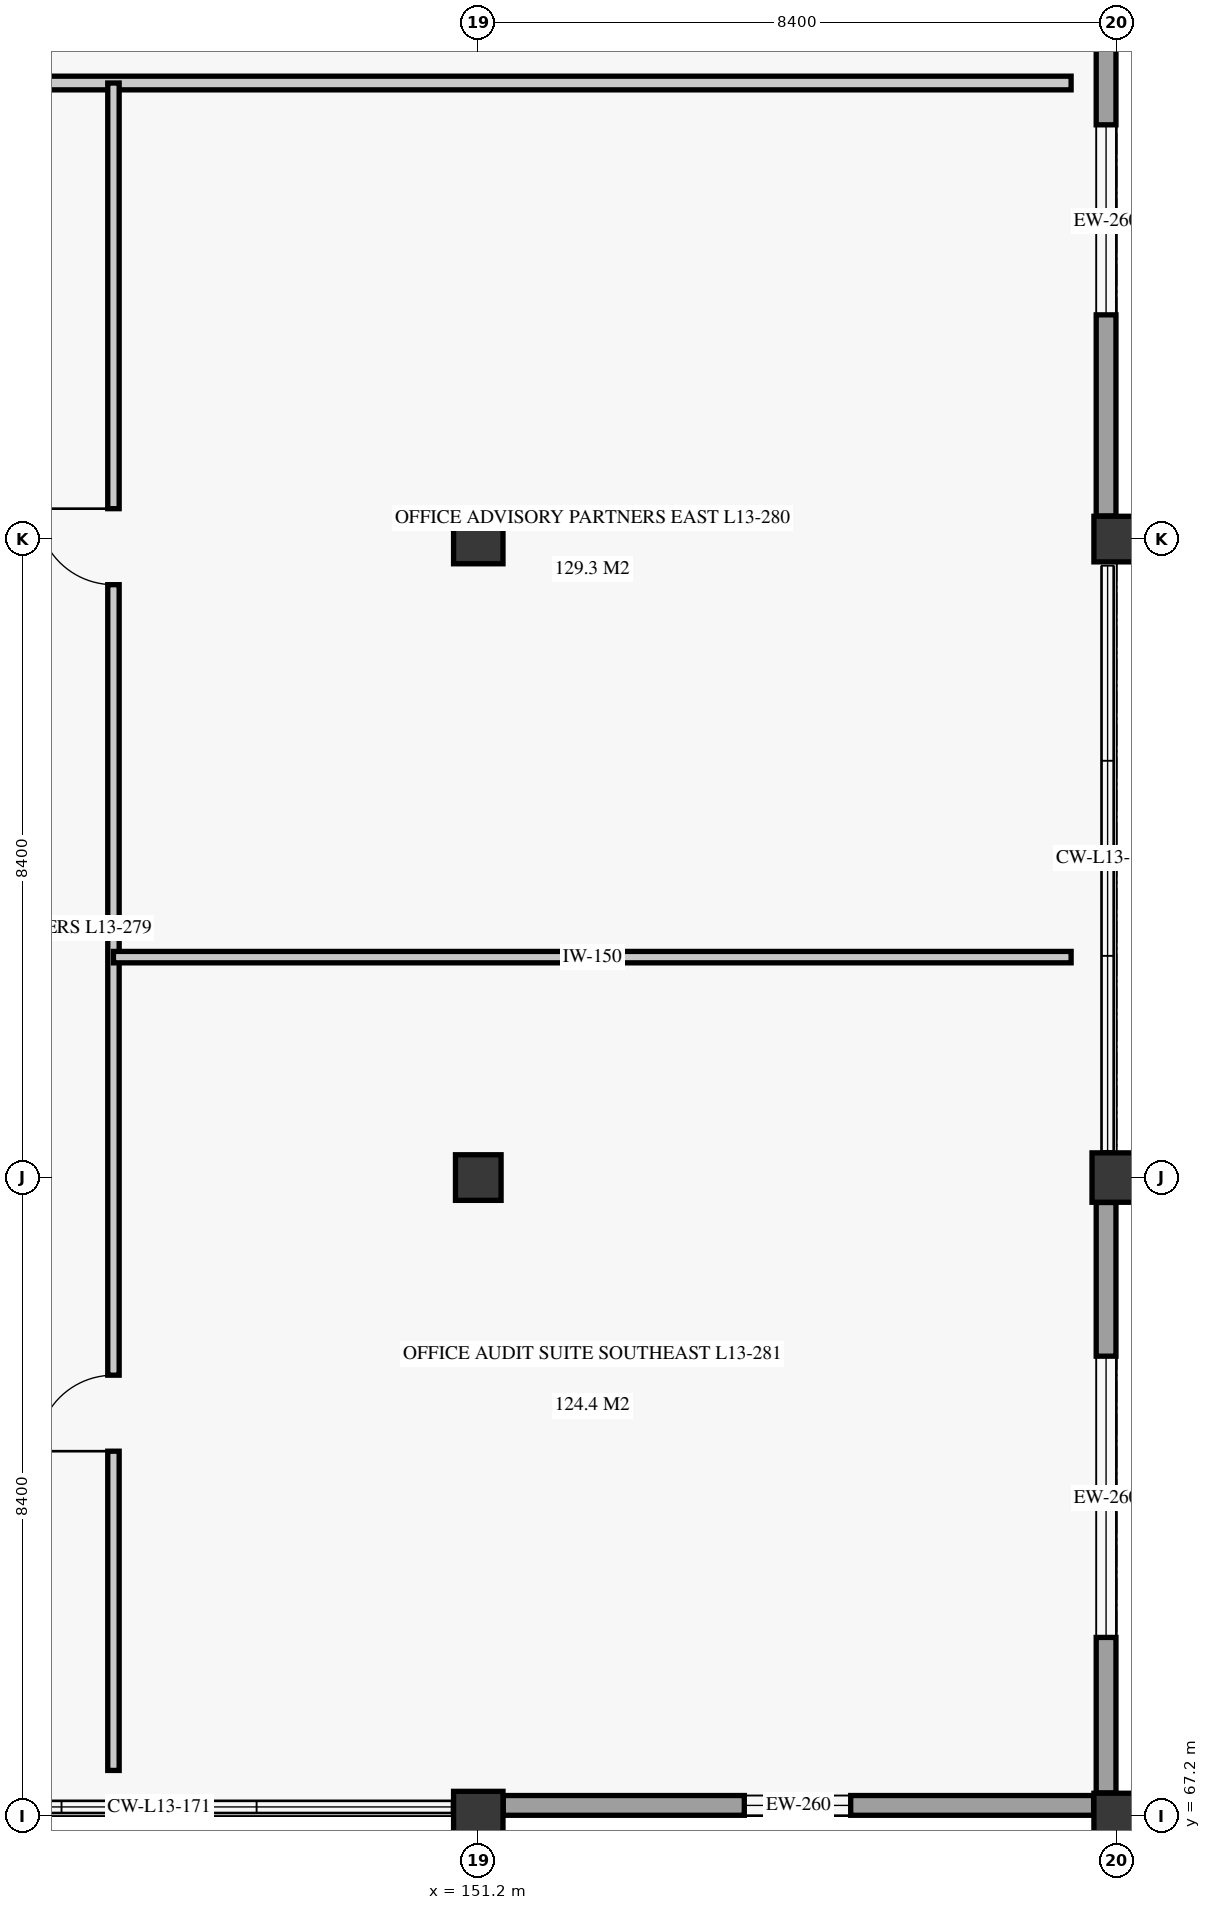
"""IFC4 building model, lengths in metres.
Left out: names, types, materials, properties, quantities, classifications, styles, units other than length and angle.
Written with IfcOpenShell. Run it as: python <this file> out.ifc"""

import sys

from ifc_helpers import new_model, si_unit, direction, frame, frame_2d, origin, origin_2d, place, context, subcontext, project, spatial, rectangle, extrude, element, fill, save


model = new_model("IFC4")
c1 = context("Model", 3, precision=1e-05, world=origin(), true_north=direction((0.0, 1.0)))
c2 = subcontext(c1, "Body", "Model", "MODEL_VIEW")
j1 = project(units=[si_unit("LENGTHUNIT", "METRE"), si_unit("PLANEANGLEUNIT", "RADIAN")], contexts=[c1])
p1 = place(None, origin())
s1 = spatial("IfcSite", under=j1, at=p1, CompositionType="ELEMENT")
p2 = place(p1, origin())
s2 = spatial("IfcBuilding", under=s1, at=p2, CompositionType="ELEMENT")
p3 = place(p2, frame((0.0, 0.0, 54.7)))
s3 = spatial("IfcBuildingStorey", under=s2, at=p3, CompositionType="ELEMENT", Elevation=54.7)
p4 = place(p3, frame((151.2, 67.2, 0.0), z_axis=(0.0, 0.0, 1.0), x_axis=(1.0, 0.0, 0.0)))
e1 = element("IfcColumn", 1, at=p4, inside=s3, PredefinedType="COLUMN", context=c2, shape_type="SweptSolid", body=[
    extrude(rectangle(XDim=0.65, YDim=0.65, at=origin_2d()), origin(), (0.0, 0.0, 1.0), 3.72),
])
p5 = place(p3, frame((151.2, 75.6, 0.0), z_axis=(0.0, 0.0, 1.0), x_axis=(1.0, 0.0, 0.0)))
e2 = element("IfcColumn", 2, at=p5, inside=s3, PredefinedType="COLUMN", context=c2, shape_type="SweptSolid", body=[
    extrude(rectangle(XDim=0.6, YDim=0.6, at=origin_2d()), origin(), (0.0, 0.0, 1.0), 3.72),
])
p6 = place(p3, frame((151.2, 84.0, 0.0), z_axis=(0.0, 0.0, 1.0), x_axis=(1.0, 0.0, 0.0)))
e3 = element("IfcColumn", 3, at=p6, inside=s3, PredefinedType="COLUMN", context=c2, shape_type="SweptSolid", body=[
    extrude(rectangle(XDim=0.65, YDim=0.65, at=origin_2d()), origin(), (0.0, 0.0, 1.0), 3.72),
])
p7 = place(p3, frame((159.6, 67.2, 0.0), z_axis=(0.0, 0.0, 1.0), x_axis=(1.0, 0.0, 0.0)))
e4 = element("IfcColumn", 4, at=p7, inside=s3, PredefinedType="COLUMN", context=c2, shape_type="SweptSolid", body=[
    extrude(rectangle(XDim=0.6, YDim=0.6, at=origin_2d()), origin(), (0.0, 0.0, 1.0), 3.72),
])
p8 = place(p3, frame((159.6, 75.6, 0.0), z_axis=(0.0, 0.0, 1.0), x_axis=(1.0, 0.0, 0.0)))
e5 = element("IfcColumn", 5, at=p8, inside=s3, PredefinedType="COLUMN", context=c2, shape_type="SweptSolid", body=[
    extrude(rectangle(XDim=0.65, YDim=0.65, at=origin_2d()), origin(), (0.0, 0.0, 1.0), 3.72),
])
p9 = place(p3, frame((159.6, 84.0, 0.0), z_axis=(0.0, 0.0, 1.0), x_axis=(1.0, 0.0, 0.0)))
e6 = element("IfcColumn", 6, at=p9, inside=s3, PredefinedType="COLUMN", context=c2, shape_type="SweptSolid", body=[
    extrude(rectangle(XDim=0.6, YDim=0.6, at=origin_2d()), origin(), (0.0, 0.0, 1.0), 3.72),
])
p10 = place(p3, frame((151.528, 67.34, 0.0), z_axis=(0.0, 0.0, 1.0), x_axis=(1.0, 0.0, 0.0)))
e7 = element("IfcWall", 7, at=p10, inside=s3, PredefinedType="SOLIDWALL", context=c2, shape_type="SweptSolid", body=[
    extrude(rectangle(XDim=7.768, YDim=0.26, at=frame_2d((3.884, 0.0))), origin(), (0.0, 0.0, 1.0), 3.04),
])
p11 = place(p10, frame((3.172, 0.0, 0.85)))
e8 = element("IfcOpeningElement", 8, at=p11, cuts=e7, PredefinedType="OPENING", context=c2, shape_type="SweptSolid", body=[
    extrude(rectangle(XDim=1.4, YDim=1.7, at=frame_2d((0.7, 0.85))), frame((0.0, 0.14, 0.0), z_axis=(0.0, -1.0, 0.0), x_axis=(1.0, 0.0, 0.0)), (0.0, 0.0, 1.0), 0.28),
])
p12 = place(p3, frame((159.46, 67.504, 0.0), z_axis=(0.0, 0.0, 1.0), x_axis=(0.0, 1.0, 0.0)))
e9 = element("IfcWall", 9, at=p12, inside=s3, PredefinedType="SOLIDWALL", context=c2, shape_type="SweptSolid", body=[
    extrude(rectangle(XDim=7.768, YDim=0.26, at=frame_2d((3.884, 0.0))), origin(), (0.0, 0.0, 1.0), 3.04),
])
p13 = place(p12, frame((2.046, 0.0, 0.85)))
e10 = element("IfcOpeningElement", 10, at=p13, cuts=e9, PredefinedType="OPENING", context=c2, shape_type="SweptSolid", body=[
    extrude(rectangle(XDim=3.7, YDim=1.9, at=frame_2d((1.85, 0.95))), frame((0.0, 0.14, 0.0), z_axis=(0.0, -1.0, 0.0), x_axis=(1.0, 0.0, 0.0)), (0.0, 0.0, 1.0), 0.28),
])
p14 = place(p3, frame((159.46, 84.304, 0.0), z_axis=(0.0, 0.0, 1.0), x_axis=(0.0, 1.0, 0.0)))
e11 = element("IfcWall", 11, at=p14, inside=s3, PredefinedType="SOLIDWALL", context=c2, shape_type="SweptSolid", body=[
    extrude(rectangle(XDim=7.768, YDim=0.26, at=frame_2d((3.884, 0.0))), origin(), (0.0, 0.0, 1.0), 3.04),
])
p15 = place(p14, frame((2.646, 0.0, 0.85)))
e12 = element("IfcOpeningElement", 12, at=p15, cuts=e11, PredefinedType="OPENING", context=c2, shape_type="SweptSolid", body=[
    extrude(rectangle(XDim=2.5, YDim=1.8, at=frame_2d((1.25, 0.9))), frame((0.0, 0.14, 0.0), z_axis=(0.0, -1.0, 0.0), x_axis=(1.0, 0.0, 0.0)), (0.0, 0.0, 1.0), 0.28),
])
p16 = place(p3, frame((118.2, 90.0, 0.0), z_axis=(0.0, 0.0, 1.0), x_axis=(1.0, 0.0, 0.0)))
e13 = element("IfcWall", 13, at=p16, inside=s3, PredefinedType="PARTITIONING", context=c2, shape_type="SweptSolid", body=[
    extrude(rectangle(XDim=40.8, YDim=0.18, at=frame_2d((20.4, 0.0))), origin(), (0.0, 0.0, 1.0), 3.34),
])
p17 = place(p16, frame((3.2, 0.0, 0.0)))
e14 = element("IfcOpeningElement", 14, at=p17, cuts=e13, PredefinedType="OPENING", context=c2, shape_type="SweptSolid", body=[
    extrude(rectangle(XDim=1.05, YDim=2.2, at=frame_2d((0.525, 1.1))), frame((0.0, 0.1, 0.0), z_axis=(0.0, -1.0, 0.0), x_axis=(1.0, 0.0, 0.0)), (0.0, 0.0, 1.0), 0.2),
])
p18 = place(p16, frame((20.6, 0.0, 0.0)))
e15 = element("IfcOpeningElement", 15, at=p18, cuts=e13, PredefinedType="OPENING", context=c2, shape_type="SweptSolid", body=[
    extrude(rectangle(XDim=1.05, YDim=2.2, at=frame_2d((0.525, 1.1))), frame((0.0, 0.1, 0.0), z_axis=(0.0, -1.0, 0.0), x_axis=(1.0, 0.0, 0.0)), (0.0, 0.0, 1.0), 0.2),
])
p19 = place(p3, frame((146.4, 67.8, 0.0), z_axis=(0.0, 0.0, 1.0), x_axis=(0.0, 1.0, 0.0)))
e16 = element("IfcWall", 16, at=p19, inside=s3, PredefinedType="PARTITIONING", context=c2, shape_type="SweptSolid", body=[
    extrude(rectangle(XDim=22.2, YDim=0.15, at=frame_2d((11.1, 0.0))), origin(), (0.0, 0.0, 1.0), 3.34),
])
p20 = place(p19, frame((4.2, 0.0, 0.0)))
e17 = element("IfcOpeningElement", 17, at=p20, cuts=e16, PredefinedType="OPENING", context=c2, shape_type="SweptSolid", body=[
    extrude(rectangle(XDim=1.0, YDim=2.1, at=frame_2d((0.5, 1.05))), frame((0.0, 0.085, 0.0), z_axis=(0.0, -1.0, 0.0), x_axis=(1.0, 0.0, 0.0)), (0.0, 0.0, 1.0), 0.17),
])
p21 = place(p19, frame((15.6, 0.0, 0.0)))
e18 = element("IfcOpeningElement", 18, at=p21, cuts=e16, PredefinedType="OPENING", context=c2, shape_type="SweptSolid", body=[
    extrude(rectangle(XDim=1.0, YDim=2.1, at=frame_2d((0.5, 1.05))), frame((0.0, 0.085, 0.0), z_axis=(0.0, -1.0, 0.0), x_axis=(1.0, 0.0, 0.0)), (0.0, 0.0, 1.0), 0.17),
])
p22 = place(p3, frame((146.4, 78.5, 0.0), z_axis=(0.0, 0.0, 1.0), x_axis=(1.0, 0.0, 0.0)))
e19 = element("IfcWall", 19, at=p22, inside=s3, PredefinedType="PARTITIONING", context=c2, shape_type="SweptSolid", body=[
    extrude(rectangle(XDim=12.6, YDim=0.15, at=frame_2d((6.3, 0.0))), origin(), (0.0, 0.0, 1.0), 3.34),
])
p23 = place(p11, origin())
e20 = element("IfcWindow", 20, at=p23, inside=s3, PartitioningType="SINGLE_PANEL", PredefinedType="WINDOW", context=c2, shape_type="SweptSolid", body=[
    extrude(rectangle(XDim=1.4, YDim=1.7, at=frame_2d((0.7, 0.85))), frame((0.0, 0.03, 0.0), z_axis=(0.0, -1.0, 0.0), x_axis=(1.0, 0.0, 0.0)), (0.0, 0.0, 1.0), 0.06),
])
fill(e8, e20)
p24 = place(p13, origin())
e21 = element("IfcWindow", 21, at=p24, inside=s3, PartitioningType="SINGLE_PANEL", PredefinedType="WINDOW", context=c2, shape_type="SweptSolid", body=[
    extrude(rectangle(XDim=3.7, YDim=1.9, at=frame_2d((1.85, 0.95))), frame((0.0, 0.03, 0.0), z_axis=(0.0, -1.0, 0.0), x_axis=(1.0, 0.0, 0.0)), (0.0, 0.0, 1.0), 0.06),
])
fill(e10, e21)
p25 = place(p15, origin())
e22 = element("IfcWindow", 22, at=p25, inside=s3, PartitioningType="SINGLE_PANEL", PredefinedType="WINDOW", context=c2, shape_type="SweptSolid", body=[
    extrude(rectangle(XDim=2.5, YDim=1.8, at=frame_2d((1.25, 0.9))), frame((0.0, 0.03, 0.0), z_axis=(0.0, -1.0, 0.0), x_axis=(1.0, 0.0, 0.0)), (0.0, 0.0, 1.0), 0.06),
])
fill(e12, e22)
p26 = place(p20, origin())
e23 = element("IfcDoor", 23, at=p26, inside=s3, OperationType="SINGLE_SWING_LEFT", PredefinedType="DOOR", context=c2, shape_type="SweptSolid", body=[
    extrude(rectangle(XDim=1.0, YDim=2.1, at=frame_2d((0.5, 1.05))), frame((0.0, 0.025, 0.0), z_axis=(0.0, -1.0, 0.0), x_axis=(1.0, 0.0, 0.0)), (0.0, 0.0, 1.0), 0.05),
])
fill(e17, e23)
p27 = place(p21, origin())
e24 = element("IfcDoor", 24, at=p27, inside=s3, OperationType="SINGLE_SWING_RIGHT", PredefinedType="DOOR", context=c2, shape_type="SweptSolid", body=[
    extrude(rectangle(XDim=1.0, YDim=2.1, at=frame_2d((0.5, 1.05))), frame((0.0, 0.025, 0.0), z_axis=(0.0, -1.0, 0.0), x_axis=(1.0, 0.0, 0.0)), (0.0, 0.0, 1.0), 0.05),
])
fill(e18, e24)
save(model, sys.argv[1])
